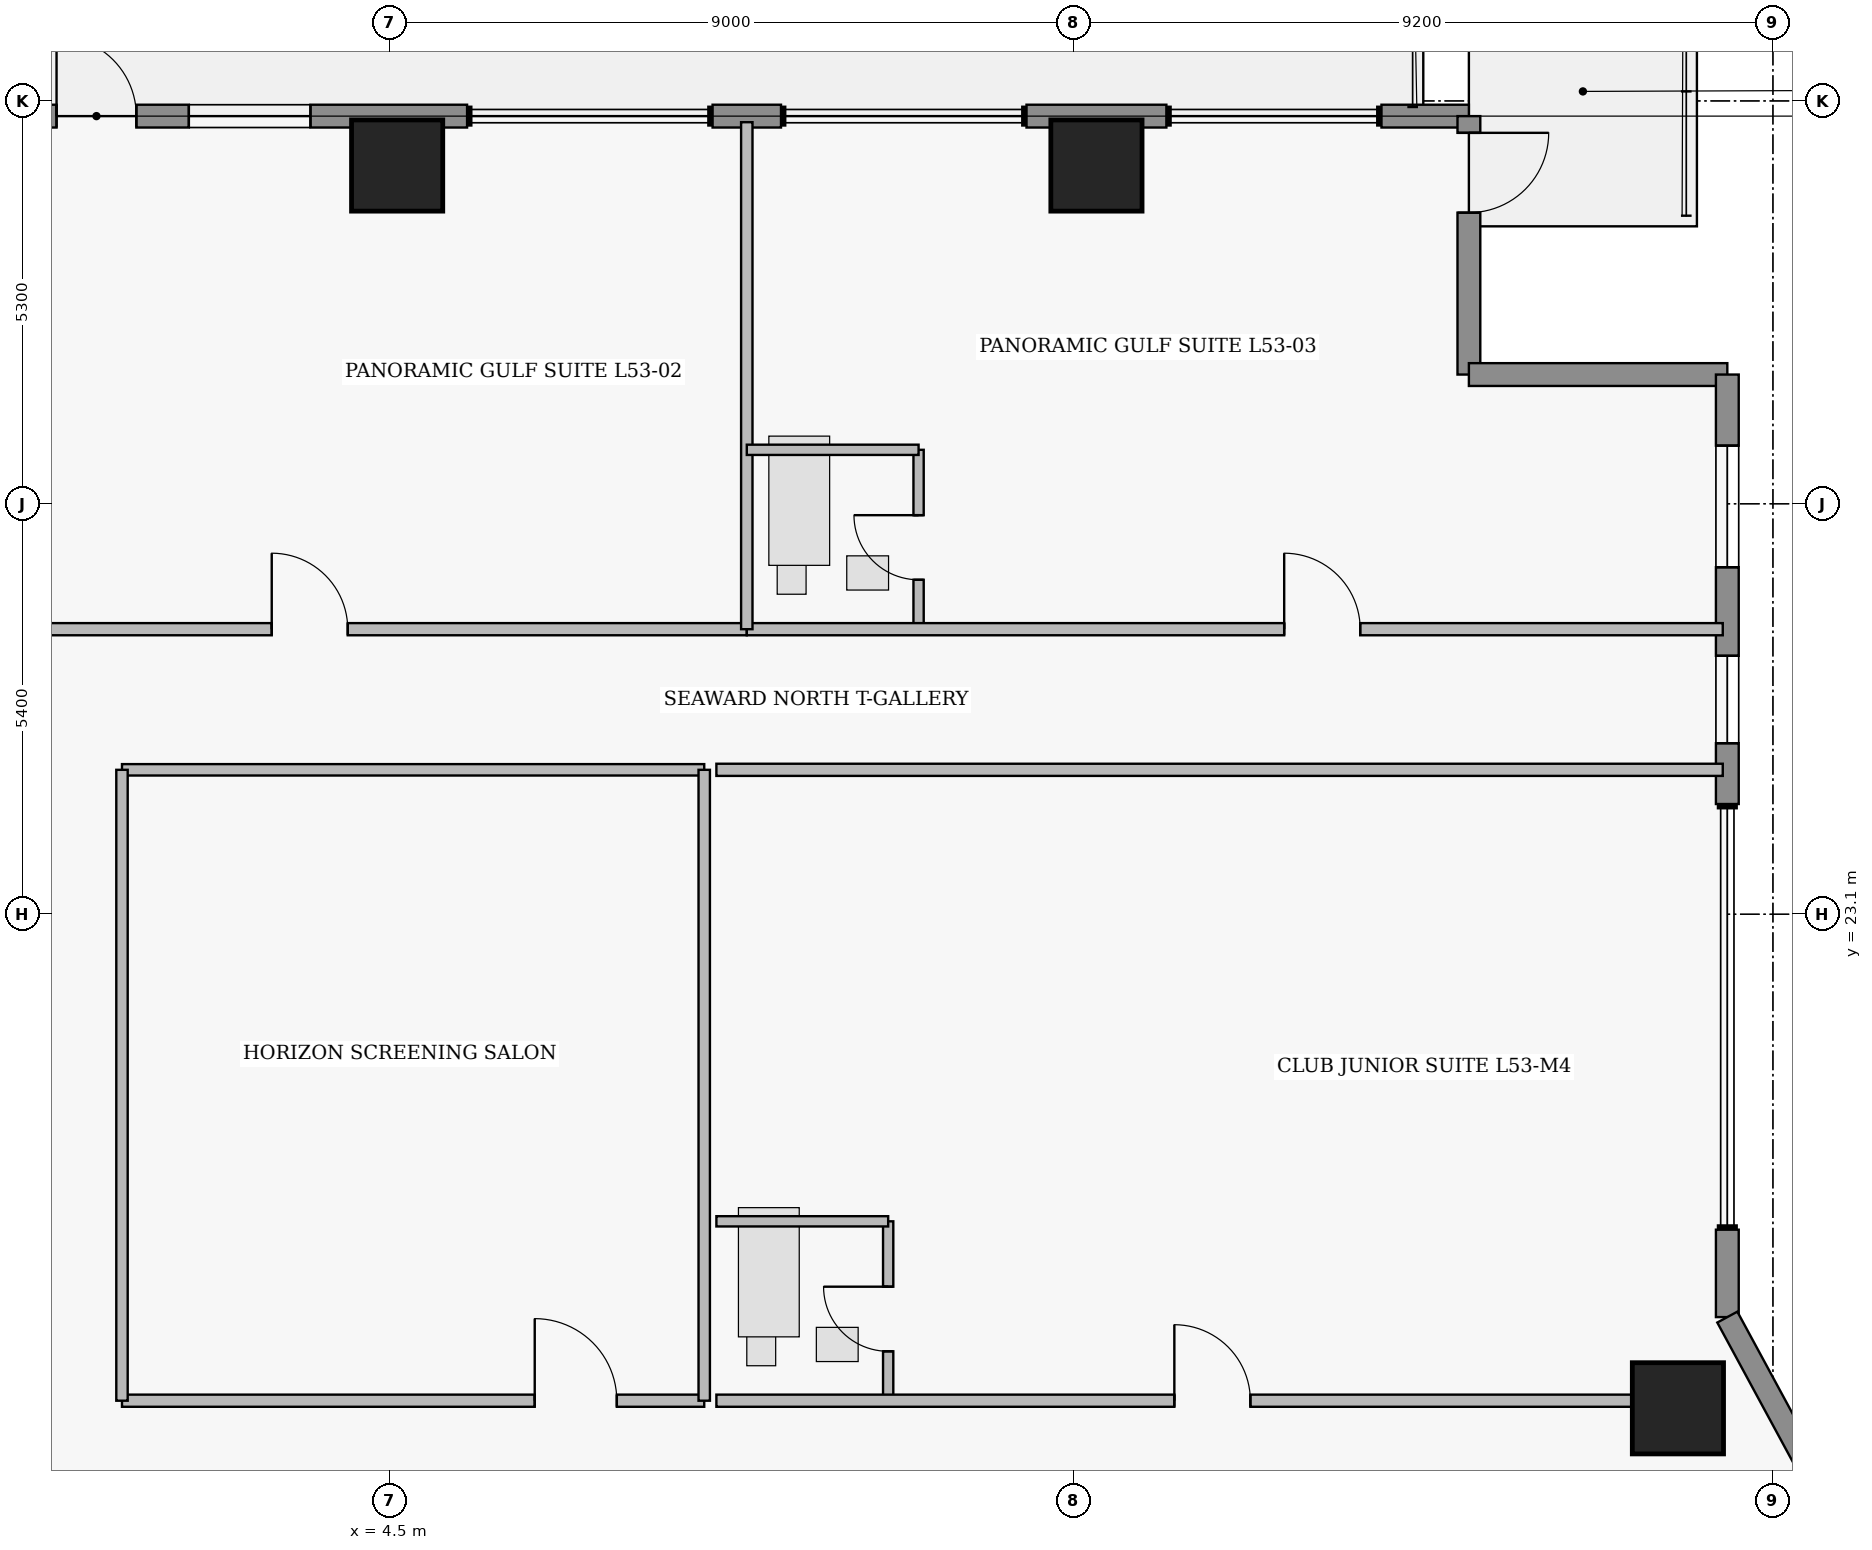
"""IFC4 building model, lengths in metres.
Left out: names, types, materials, properties, quantities, classifications, styles, units other than length and angle.
Written with IfcOpenShell. Run it as: python <this file> out.ifc"""

import sys

from ifc_helpers import new_model, si_unit, direction, frame, frame_2d, origin, origin_2d, place, context, subcontext, project, spatial, rectangle, extrude, element, fill, save


model = new_model("IFC4")
c1 = context("Model", 3, precision=1e-05, world=origin(), true_north=direction((0.0, 1.0)))
c2 = subcontext(c1, "Body", "Model", "MODEL_VIEW")
j1 = project(units=[si_unit("LENGTHUNIT", "METRE"), si_unit("PLANEANGLEUNIT", "RADIAN")], contexts=[c1])
p1 = place(None, origin())
s1 = spatial("IfcSite", under=j1, at=p1, CompositionType="ELEMENT")
p2 = place(p1, origin())
s2 = spatial("IfcBuilding", under=s1, at=p2, CompositionType="ELEMENT")
p3 = place(p2, frame((0.0, 0.0, 211.15)))
s3 = spatial("IfcBuildingStorey", under=s2, at=p3, CompositionType="ELEMENT", Elevation=211.15)
for number, where, z_axis, x_axis in (
    (1, (4.6, 32.95, 0.0), (0.0, 0.0, 1.0), (1.0, 0.0, 0.0)),
    (2, (13.8, 32.95, 0.0), (0.0, 0.0, 1.0), (1.0, 0.0, 0.0)),
    (3, (21.45, 16.6, 0.0), (0.0, 0.0, 1.0), (1.0, 0.0, 0.0)),
):
    element("IfcColumn", number, at=place(p3, frame(where, z_axis=z_axis, x_axis=x_axis)), inside=s3, PredefinedType="COLUMN", context=c2, shape_type="SweptSolid", body=[
        extrude(rectangle(XDim=1.2, YDim=1.2, at=origin_2d()), origin(), (0.0, 0.0, 1.0), 3.75),
    ])
p4 = place(p3, frame((-0.531, 33.6, 0.0), z_axis=(0.0, 0.0, 1.0), x_axis=(1.0, 0.0, 0.0)))
e4 = element("IfcWall", 4, at=p4, inside=s3, PredefinedType="STANDARD", context=c2, shape_type="SweptSolid", body=[
    extrude(rectangle(XDim=6.051, YDim=0.3, at=frame_2d((3.025, 0.0))), origin(), (0.0, 0.0, 1.0), 3.53),
])
p5 = place(p4, frame((0.65, 0.0, 0.0)))
e5 = element("IfcOpeningElement", 5, at=p5, cuts=e4, PredefinedType="OPENING", context=c2, shape_type="SweptSolid", body=[
    extrude(rectangle(XDim=1.05, YDim=2.2, at=frame_2d((0.525, 1.1))), frame((0.0, 0.16, 0.0), z_axis=(0.0, -1.0, 0.0), x_axis=(1.0, 0.0, 0.0)), (0.0, 0.0, 1.0), 0.32),
])
p6 = place(p4, frame((2.39, 0.0, 0.85)))
e6 = element("IfcOpeningElement", 6, at=p6, cuts=e4, PredefinedType="OPENING", context=c2, shape_type="SweptSolid", body=[
    extrude(rectangle(XDim=1.6, YDim=1.8, at=frame_2d((0.8, 0.9))), frame((0.0, 0.16, 0.0), z_axis=(0.0, -1.0, 0.0), x_axis=(1.0, 0.0, 0.0)), (0.0, 0.0, 1.0), 0.32),
])
p7 = place(p3, frame((8.75, 33.6, 0.0), z_axis=(0.0, 0.0, 1.0), x_axis=(1.0, 0.0, 0.0)))
e7 = element("IfcWall", 7, at=p7, inside=s3, PredefinedType="STANDARD", context=c2, shape_type="SweptSolid", body=[
    extrude(rectangle(XDim=0.9, YDim=0.3, at=frame_2d((0.45, 0.0))), origin(), (0.0, 0.0, 1.0), 3.53),
])
p8 = place(p3, frame((12.88, 33.6, 0.0), z_axis=(0.0, 0.0, 1.0), x_axis=(1.0, 0.0, 0.0)))
e8 = element("IfcWall", 8, at=p8, inside=s3, PredefinedType="STANDARD", context=c2, shape_type="SweptSolid", body=[
    extrude(rectangle(XDim=1.84, YDim=0.3, at=frame_2d((0.92, 0.0))), origin(), (0.0, 0.0, 1.0), 3.53),
])
p9 = place(p3, frame((17.55, 33.6, 0.0), z_axis=(0.0, 0.0, 1.0), x_axis=(1.0, 0.0, 0.0)))
e9 = element("IfcWall", 9, at=p9, inside=s3, PredefinedType="STANDARD", context=c2, shape_type="SweptSolid", body=[
    extrude(rectangle(XDim=1.15, YDim=0.3, at=frame_2d((0.575, 0.0))), origin(), (0.0, 0.0, 1.0), 3.53),
])
p10 = place(p3, frame((18.7, 33.6, 0.0), z_axis=(0.0, 0.0, 1.0), x_axis=(0.0, -1.0, 0.0)))
e10 = element("IfcWall", 10, at=p10, inside=s3, PredefinedType="STANDARD", context=c2, shape_type="SweptSolid", body=[
    extrude(rectangle(XDim=3.4, YDim=0.3, at=frame_2d((1.7, 0.0))), origin(), (0.0, 0.0, 1.0), 3.53),
])
p11 = place(p10, frame((0.22, 0.0, 0.0)))
e11 = element("IfcOpeningElement", 11, at=p11, cuts=e10, PredefinedType="OPENING", context=c2, shape_type="SweptSolid", body=[
    extrude(rectangle(XDim=1.05, YDim=2.2, at=frame_2d((0.525, 1.1))), frame((0.0, 0.16, 0.0), z_axis=(0.0, -1.0, 0.0), x_axis=(1.0, 0.0, 0.0)), (0.0, 0.0, 1.0), 0.32),
])
p12 = place(p3, frame((18.7, 30.2, 0.0), z_axis=(0.0, 0.0, 1.0), x_axis=(1.0, 0.0, 0.0)))
e12 = element("IfcWall", 12, at=p12, inside=s3, PredefinedType="STANDARD", context=c2, shape_type="SweptSolid", body=[
    extrude(rectangle(XDim=3.4, YDim=0.3, at=frame_2d((1.7, 0.0))), origin(), (0.0, 0.0, 1.0), 3.53),
])
p13 = place(p3, frame((22.1, 30.2, 0.0), z_axis=(0.0, 0.0, 1.0), x_axis=(0.0, -1.0, 0.0)))
e13 = element("IfcWall", 13, at=p13, inside=s3, PredefinedType="STANDARD", context=c2, shape_type="SweptSolid", body=[
    extrude(rectangle(XDim=5.65, YDim=0.3, at=frame_2d((2.825, 0.0))), origin(), (0.0, 0.0, 1.0), 3.53),
])
p14 = place(p13, frame((0.935, 0.0, 0.85)))
e14 = element("IfcOpeningElement", 14, at=p14, cuts=e13, PredefinedType="OPENING", context=c2, shape_type="SweptSolid", body=[
    extrude(rectangle(XDim=1.6, YDim=1.8, at=frame_2d((0.8, 0.9))), frame((0.0, 0.16, 0.0), z_axis=(0.0, -1.0, 0.0), x_axis=(1.0, 0.0, 0.0)), (0.0, 0.0, 1.0), 0.32),
])
p15 = place(p13, frame((3.7, 0.0, 0.95)))
e15 = element("IfcOpeningElement", 15, at=p15, cuts=e13, PredefinedType="OPENING", context=c2, shape_type="SweptSolid", body=[
    extrude(rectangle(XDim=1.15, YDim=1.55, at=frame_2d((0.575, 0.775))), frame((0.0, 0.16, 0.0), z_axis=(0.0, -1.0, 0.0), x_axis=(1.0, 0.0, 0.0)), (0.0, 0.0, 1.0), 0.32),
])
p16 = place(p3, frame((22.1, 18.95, 0.0), z_axis=(0.0, 0.0, 1.0), x_axis=(0.0, -1.0, 0.0)))
e16 = element("IfcWall", 16, at=p16, inside=s3, PredefinedType="STANDARD", context=c2, shape_type="SweptSolid", body=[
    extrude(rectangle(XDim=1.15, YDim=0.3, at=frame_2d((0.575, 0.0))), origin(), (0.0, 0.0, 1.0), 3.53),
])
p17 = place(p3, frame((22.1, 17.8, 0.0), z_axis=(0.0, 0.0, 1.0), x_axis=(0.476258655584, -0.879305233114, 0.0)))
e17 = element("IfcWall", 17, at=p17, inside=s3, PredefinedType="STANDARD", context=c2, shape_type="SweptSolid", body=[
    extrude(rectangle(XDim=5.459, YDim=0.3, at=frame_2d((2.729, 0.0))), origin(), (0.0, 0.0, 1.0), 3.53),
])
p18 = place(p3, frame((-4.6, 26.85, 0.0), z_axis=(0.0, 0.0, 1.0), x_axis=(1.0, 0.0, 0.0)))
e18 = element("IfcWall", 18, at=p18, inside=s3, PredefinedType="PARTITIONING", context=c2, shape_type="SweptSolid", body=[
    extrude(rectangle(XDim=13.8, YDim=0.16, at=frame_2d((6.9, 0.0))), origin(), (0.0, 0.0, 1.0), 3.53),
])
p19 = place(p18, frame((7.55, 0.0, 0.0)))
e19 = element("IfcOpeningElement", 19, at=p19, cuts=e18, PredefinedType="OPENING", context=c2, shape_type="SweptSolid", body=[
    extrude(rectangle(XDim=1.0, YDim=2.15, at=frame_2d((0.5, 1.075))), frame((0.0, 0.09, 0.0), z_axis=(0.0, -1.0, 0.0), x_axis=(1.0, 0.0, 0.0)), (0.0, 0.0, 1.0), 0.18),
])
p20 = place(p3, frame((11.46, 26.85, 0.0), z_axis=(0.0, 0.0, 1.0), x_axis=(0.0, 1.0, 0.0)))
e20 = element("IfcWall", 20, at=p20, inside=s3, PredefinedType="PLUMBINGWALL", context=c2, shape_type="SweptSolid", body=[
    extrude(rectangle(XDim=2.36, YDim=0.135, at=frame_2d((1.18, 0.0))), origin(), (0.0, 0.0, 1.0), 3.53),
])
p21 = place(p20, frame((0.65, 0.0, 0.0)))
e21 = element("IfcOpeningElement", 21, at=p21, cuts=e20, PredefinedType="OPENING", context=c2, shape_type="SweptSolid", body=[
    extrude(rectangle(XDim=0.85, YDim=2.1, at=frame_2d((0.425, 1.05))), frame((0.0, 0.077, 0.0), z_axis=(0.0, -1.0, 0.0), x_axis=(1.0, 0.0, 0.0)), (0.0, 0.0, 1.0), 0.155),
])
p22 = place(p3, frame((9.2, 26.85, 0.0), z_axis=(0.0, 0.0, 1.0), x_axis=(1.0, 0.0, 0.0)))
e22 = element("IfcWall", 22, at=p22, inside=s3, PredefinedType="PARTITIONING", context=c2, shape_type="SweptSolid", body=[
    extrude(rectangle(XDim=12.84, YDim=0.16, at=frame_2d((6.42, 0.0))), origin(), (0.0, 0.0, 1.0), 3.53),
])
p23 = place(p22, frame((7.07, 0.0, 0.0)))
e23 = element("IfcOpeningElement", 23, at=p23, cuts=e22, PredefinedType="OPENING", context=c2, shape_type="SweptSolid", body=[
    extrude(rectangle(XDim=1.0, YDim=2.15, at=frame_2d((0.5, 1.075))), frame((0.0, 0.09, 0.0), z_axis=(0.0, -1.0, 0.0), x_axis=(1.0, 0.0, 0.0)), (0.0, 0.0, 1.0), 0.18),
])
p24 = place(p3, frame((0.98, 16.7, 0.0), z_axis=(0.0, 0.0, 1.0), x_axis=(1.0, 0.0, 0.0)))
e24 = element("IfcWall", 24, at=p24, inside=s3, PredefinedType="PARTITIONING", context=c2, shape_type="SweptSolid", body=[
    extrude(rectangle(XDim=7.66, YDim=0.16, at=frame_2d((3.83, 0.0))), origin(), (0.0, 0.0, 1.0), 3.124),
])
p25 = place(p24, frame((5.43, 0.0, 0.0)))
e25 = element("IfcOpeningElement", 25, at=p25, cuts=e24, PredefinedType="OPENING", context=c2, shape_type="SweptSolid", body=[
    extrude(rectangle(XDim=1.08, YDim=2.18, at=frame_2d((0.54, 1.09))), frame((0.0, 0.09, 0.0), z_axis=(0.0, -1.0, 0.0), x_axis=(1.0, 0.0, 0.0)), (0.0, 0.0, 1.0), 0.18),
])
p26 = place(p3, frame((11.06, 16.7, 0.0), z_axis=(0.0, 0.0, 1.0), x_axis=(0.0, 1.0, 0.0)))
e26 = element("IfcWall", 26, at=p26, inside=s3, PredefinedType="PLUMBINGWALL", context=c2, shape_type="SweptSolid", body=[
    extrude(rectangle(XDim=2.36, YDim=0.135, at=frame_2d((1.18, 0.0))), origin(), (0.0, 0.0, 1.0), 3.53),
])
p27 = place(p26, frame((0.65, 0.0, 0.0)))
e27 = element("IfcOpeningElement", 27, at=p27, cuts=e26, PredefinedType="OPENING", context=c2, shape_type="SweptSolid", body=[
    extrude(rectangle(XDim=0.85, YDim=2.1, at=frame_2d((0.425, 1.05))), frame((0.0, 0.077, 0.0), z_axis=(0.0, -1.0, 0.0), x_axis=(1.0, 0.0, 0.0)), (0.0, 0.0, 1.0), 0.155),
])
p28 = place(p3, frame((8.8, 16.7, 0.0), z_axis=(0.0, 0.0, 1.0), x_axis=(1.0, 0.0, 0.0)))
e28 = element("IfcWall", 28, at=p28, inside=s3, PredefinedType="PARTITIONING", context=c2, shape_type="SweptSolid", body=[
    extrude(rectangle(XDim=13.24, YDim=0.16, at=frame_2d((6.62, 0.0))), origin(), (0.0, 0.0, 1.0), 3.124),
])
p29 = place(p28, frame((6.025, 0.0, 0.0)))
e29 = element("IfcOpeningElement", 29, at=p29, cuts=e28, PredefinedType="OPENING", context=c2, shape_type="SweptSolid", body=[
    extrude(rectangle(XDim=1.0, YDim=2.15, at=frame_2d((0.5, 1.075))), frame((0.0, 0.09, 0.0), z_axis=(0.0, -1.0, 0.0), x_axis=(1.0, 0.0, 0.0)), (0.0, 0.0, 1.0), 0.18),
])
p30 = place(p3, frame((9.2, 26.85, 0.0), z_axis=(0.0, 0.0, 1.0), x_axis=(0.0, 1.0, 0.0)))
e30 = element("IfcWall", 30, at=p30, inside=s3, PredefinedType="PARTITIONING", context=c2, shape_type="SweptSolid", body=[
    extrude(rectangle(XDim=6.67, YDim=0.15, at=frame_2d((3.335, 0.0))), origin(), (0.0, 0.0, 1.0), 3.53),
])
p31 = place(p3, frame((9.2, 29.21, 0.0), z_axis=(0.0, 0.0, 1.0), x_axis=(1.0, 0.0, 0.0)))
e31 = element("IfcWall", 31, at=p31, inside=s3, PredefinedType="PLUMBINGWALL", context=c2, shape_type="SweptSolid", body=[
    extrude(rectangle(XDim=2.26, YDim=0.135, at=frame_2d((1.13, 0.0))), origin(), (0.0, 0.0, 1.0), 3.53),
])
p32 = place(p3, frame((0.98, 25.0, 0.0), z_axis=(0.0, 0.0, 1.0), x_axis=(1.0, 0.0, 0.0)))
e32 = element("IfcWall", 32, at=p32, inside=s3, PredefinedType="PARTITIONING", context=c2, shape_type="SweptSolid", body=[
    extrude(rectangle(XDim=7.66, YDim=0.15, at=frame_2d((3.83, 0.0))), origin(), (0.0, 0.0, 1.0), 3.124),
])
for number, where, z_axis, x_axis in (
    (33, (0.98, 16.7, 0.0), (0.0, 0.0, 1.0), (0.0, 1.0, 0.0)),
    (34, (8.64, 16.7, 0.0), (0.0, 0.0, 1.0), (0.0, 1.0, 0.0)),
):
    element("IfcWall", number, at=place(p3, frame(where, z_axis=z_axis, x_axis=x_axis)), inside=s3, PredefinedType="PARTITIONING", context=c2, shape_type="SweptSolid", body=[
        extrude(rectangle(XDim=8.3, YDim=0.15, at=frame_2d((4.15, 0.0))), origin(), (0.0, 0.0, 1.0), 3.53),
    ])
p33 = place(p3, frame((8.8, 19.06, 0.0), z_axis=(0.0, 0.0, 1.0), x_axis=(1.0, 0.0, 0.0)))
e35 = element("IfcWall", 35, at=p33, inside=s3, PredefinedType="PLUMBINGWALL", context=c2, shape_type="SweptSolid", body=[
    extrude(rectangle(XDim=2.26, YDim=0.135, at=frame_2d((1.13, 0.0))), origin(), (0.0, 0.0, 1.0), 3.124),
])
p34 = place(p3, frame((8.8, 25.0, 0.0), z_axis=(0.0, 0.0, 1.0), x_axis=(1.0, 0.0, 0.0)))
e36 = element("IfcWall", 36, at=p34, inside=s3, PredefinedType="PARTITIONING", context=c2, shape_type="SweptSolid", body=[
    extrude(rectangle(XDim=13.24, YDim=0.16, at=frame_2d((6.62, 0.0))), origin(), (0.0, 0.0, 1.0), 3.124),
])
p35 = place(p5, origin())
e37 = element("IfcDoor", 37, at=p35, inside=s3, OperationType="SINGLE_SWING_LEFT", PredefinedType="DOOR", context=c2, shape_type="SweptSolid", body=[
    extrude(rectangle(XDim=1.05, YDim=2.2, at=frame_2d((0.525, 1.1))), frame((0.0, 0.025, 0.0), z_axis=(0.0, -1.0, 0.0), x_axis=(1.0, 0.0, 0.0)), (0.0, 0.0, 1.0), 0.05),
])
fill(e5, e37)
p36 = place(p6, origin())
e38 = element("IfcWindow", 38, at=p36, inside=s3, PartitioningType="SINGLE_PANEL", PredefinedType="WINDOW", context=c2, shape_type="SweptSolid", body=[
    extrude(rectangle(XDim=1.6, YDim=1.8, at=frame_2d((0.8, 0.9))), frame((0.0, 0.03, 0.0), z_axis=(0.0, -1.0, 0.0), x_axis=(1.0, 0.0, 0.0)), (0.0, 0.0, 1.0), 0.06),
])
fill(e6, e38)
p37 = place(p11, origin())
e39 = element("IfcDoor", 39, at=p37, inside=s3, OperationType="SINGLE_SWING_LEFT", PredefinedType="DOOR", context=c2, shape_type="SweptSolid", body=[
    extrude(rectangle(XDim=1.05, YDim=2.2, at=frame_2d((0.525, 1.1))), frame((0.0, 0.025, 0.0), z_axis=(0.0, -1.0, 0.0), x_axis=(1.0, 0.0, 0.0)), (0.0, 0.0, 1.0), 0.05),
])
fill(e11, e39)
p38 = place(p14, origin())
e40 = element("IfcWindow", 40, at=p38, inside=s3, PartitioningType="SINGLE_PANEL", PredefinedType="WINDOW", context=c2, shape_type="SweptSolid", body=[
    extrude(rectangle(XDim=1.6, YDim=1.8, at=frame_2d((0.8, 0.9))), frame((0.0, 0.03, 0.0), z_axis=(0.0, -1.0, 0.0), x_axis=(1.0, 0.0, 0.0)), (0.0, 0.0, 1.0), 0.06),
])
fill(e14, e40)
p39 = place(p15, origin())
e41 = element("IfcWindow", 41, at=p39, inside=s3, PartitioningType="SINGLE_PANEL", PredefinedType="WINDOW", context=c2, shape_type="SweptSolid", body=[
    extrude(rectangle(XDim=1.15, YDim=1.55, at=frame_2d((0.575, 0.775))), frame((0.0, 0.03, 0.0), z_axis=(0.0, -1.0, 0.0), x_axis=(1.0, 0.0, 0.0)), (0.0, 0.0, 1.0), 0.06),
])
fill(e15, e41)
p40 = place(p19, origin())
e42 = element("IfcDoor", 42, at=p40, inside=s3, OperationType="SINGLE_SWING_LEFT", PredefinedType="DOOR", context=c2, shape_type="SweptSolid", body=[
    extrude(rectangle(XDim=1.0, YDim=2.15, at=frame_2d((0.5, 1.075))), frame((0.0, 0.025, 0.0), z_axis=(0.0, -1.0, 0.0), x_axis=(1.0, 0.0, 0.0)), (0.0, 0.0, 1.0), 0.05),
])
fill(e19, e42)
p41 = place(p21, origin())
e43 = element("IfcDoor", 43, at=p41, inside=s3, OperationType="SINGLE_SWING_RIGHT", PredefinedType="DOOR", context=c2, shape_type="SweptSolid", body=[
    extrude(rectangle(XDim=0.85, YDim=2.1, at=frame_2d((0.425, 1.05))), frame((0.0, 0.025, 0.0), z_axis=(0.0, -1.0, 0.0), x_axis=(1.0, 0.0, 0.0)), (0.0, 0.0, 1.0), 0.05),
])
fill(e21, e43)
p42 = place(p23, origin())
e44 = element("IfcDoor", 44, at=p42, inside=s3, OperationType="SINGLE_SWING_LEFT", PredefinedType="DOOR", context=c2, shape_type="SweptSolid", body=[
    extrude(rectangle(XDim=1.0, YDim=2.15, at=frame_2d((0.5, 1.075))), frame((0.0, 0.025, 0.0), z_axis=(0.0, -1.0, 0.0), x_axis=(1.0, 0.0, 0.0)), (0.0, 0.0, 1.0), 0.05),
])
fill(e23, e44)
p43 = place(p25, origin())
e45 = element("IfcDoor", 45, at=p43, inside=s3, OperationType="SINGLE_SWING_LEFT", PredefinedType="DOOR", context=c2, shape_type="SweptSolid", body=[
    extrude(rectangle(XDim=1.08, YDim=2.18, at=frame_2d((0.54, 1.09))), frame((0.0, 0.025, 0.0), z_axis=(0.0, -1.0, 0.0), x_axis=(1.0, 0.0, 0.0)), (0.0, 0.0, 1.0), 0.05),
])
fill(e25, e45)
p44 = place(p27, origin())
e46 = element("IfcDoor", 46, at=p44, inside=s3, OperationType="SINGLE_SWING_RIGHT", PredefinedType="DOOR", context=c2, shape_type="SweptSolid", body=[
    extrude(rectangle(XDim=0.85, YDim=2.1, at=frame_2d((0.425, 1.05))), frame((0.0, 0.025, 0.0), z_axis=(0.0, -1.0, 0.0), x_axis=(1.0, 0.0, 0.0)), (0.0, 0.0, 1.0), 0.05),
])
fill(e27, e46)
p45 = place(p29, origin())
e47 = element("IfcDoor", 47, at=p45, inside=s3, OperationType="SINGLE_SWING_LEFT", PredefinedType="DOOR", context=c2, shape_type="SweptSolid", body=[
    extrude(rectangle(XDim=1.0, YDim=2.15, at=frame_2d((0.5, 1.075))), frame((0.0, 0.025, 0.0), z_axis=(0.0, -1.0, 0.0), x_axis=(1.0, 0.0, 0.0)), (0.0, 0.0, 1.0), 0.05),
])
fill(e29, e47)
save(model, sys.argv[1])
